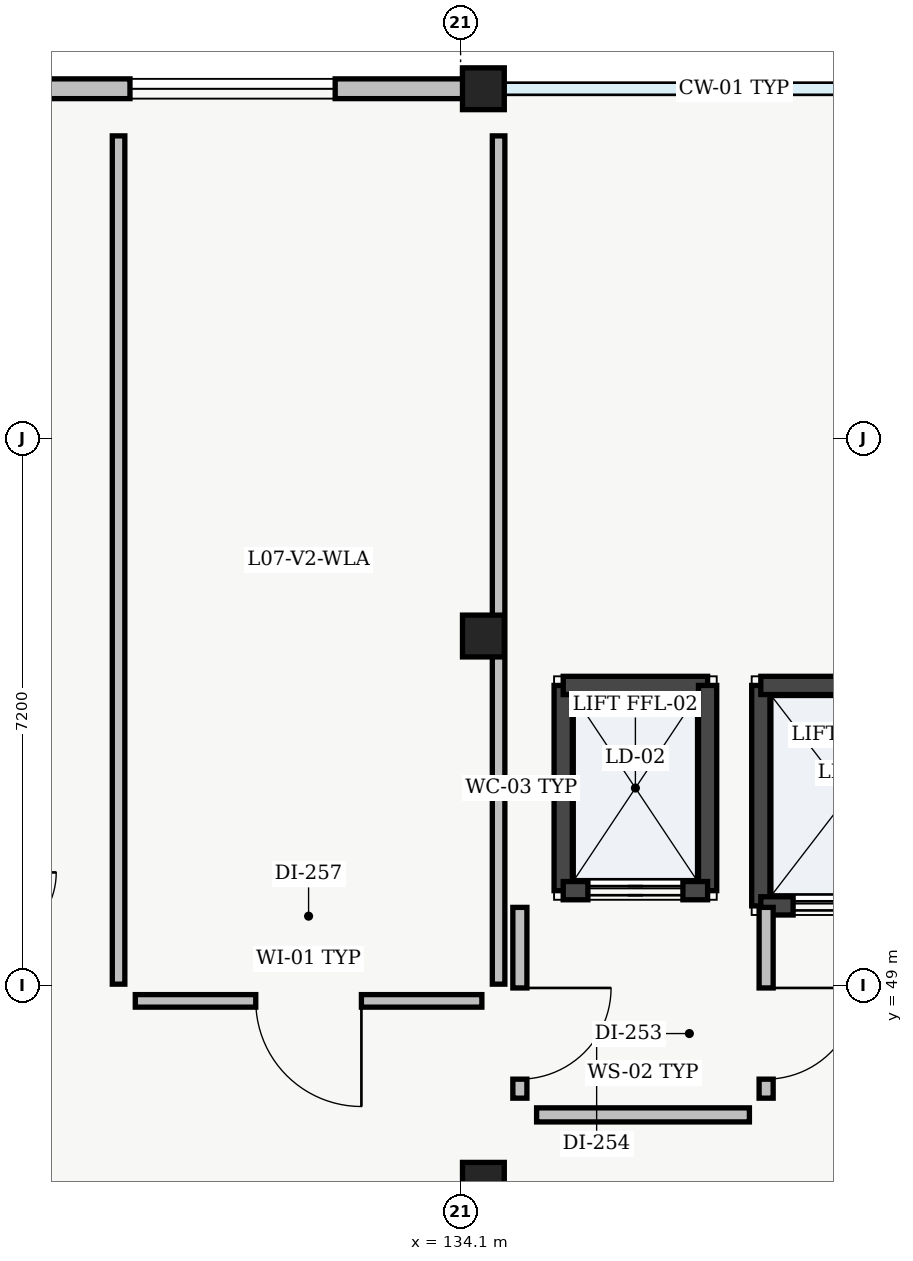
"""IFC4 building model, lengths in metres.
Left out: names, types, materials, properties, quantities, classifications, styles, units other than length and angle.
Written with IfcOpenShell. Run it as: python <this file> out.ifc"""

import sys

from ifc_helpers import new_model, si_unit, direction, frame, frame_2d, origin, origin_2d, place, context, subcontext, project, spatial, rectangle, extrude, element, fill, save


model = new_model("IFC4")
c1 = context("Model", 3, precision=1e-05, world=origin(), true_north=direction((0.0, 1.0)))
c2 = subcontext(c1, "Body", "Model", "MODEL_VIEW")
j1 = project(units=[si_unit("LENGTHUNIT", "METRE"), si_unit("PLANEANGLEUNIT", "RADIAN")], contexts=[c1])
p1 = place(None, origin())
s1 = spatial("IfcSite", under=j1, at=p1, CompositionType="ELEMENT")
p2 = place(p1, origin())
s2 = spatial("IfcBuilding", under=s1, at=p2, CompositionType="ELEMENT")
p3 = place(p2, frame((0.0, 0.0, 32.1)))
s3 = spatial("IfcBuildingStorey", under=s2, at=p3, CompositionType="ELEMENT", Elevation=32.1)
for number, where, z_axis, x_axis in (
    (1, (134.4, 46.4, 0.0), (0.0, 0.0, 1.0), (1.0, 0.0, 0.0)),
    (2, (134.4, 53.6, 0.0), (0.0, 0.0, 1.0), (1.0, 0.0, 0.0)),
    (3, (134.4, 60.8, 0.0), (0.0, 0.0, 1.0), (1.0, 0.0, 0.0)),
):
    element("IfcColumn", number, at=place(p3, frame(where, z_axis=z_axis, x_axis=x_axis)), inside=s3, PredefinedType="COLUMN", context=c2, shape_type="SweptSolid", body=[
        extrude(rectangle(XDim=0.55, YDim=0.55, at=origin_2d()), origin(), (0.0, 0.0, 1.0), 4.305),
    ])
p4 = place(p3, frame((128.07, 60.8, 0.0), z_axis=(0.0, 0.0, 1.0), x_axis=(1.0, 0.0, 0.0)))
e4 = element("IfcWall", 4, at=p4, inside=s3, PredefinedType="STANDARD", context=c2, shape_type="SweptSolid", body=[
    extrude(rectangle(XDim=6.06, YDim=0.26, at=frame_2d((3.03, 0.0))), origin(), (0.0, 0.0, 1.0), 3.79),
])
p5 = place(p4, frame((1.68, 0.0, 0.95)))
e5 = element("IfcOpeningElement", 5, at=p5, cuts=e4, PredefinedType="OPENING", context=c2, shape_type="SweptSolid", body=[
    extrude(rectangle(XDim=2.7, YDim=1.8, at=frame_2d((1.35, 0.9))), frame((0.0, 0.13, 0.0), z_axis=(0.0, -1.0, 0.0), x_axis=(1.0, 0.0, 0.0)), (0.0, 0.0, 1.0), 0.26),
])
p6 = place(p3, frame((135.45, 50.25, 0.0), z_axis=(0.0, 0.0, 1.0), x_axis=(0.0, 1.0, 0.0)))
e6 = element("IfcWall", 6, at=p6, inside=s3, PredefinedType="SHEAR", context=c2, shape_type="SweptSolid", body=[
    extrude(rectangle(XDim=2.7, YDim=0.24, at=frame_2d((1.35, 0.0))), origin(), (0.0, 0.0, 1.0), 4.35),
])
p7 = place(p3, frame((135.45, 52.95, 0.0), z_axis=(0.0, 0.0, 1.0), x_axis=(1.0, 0.0, 0.0)))
e7 = element("IfcWall", 7, at=p7, inside=s3, PredefinedType="SHEAR", context=c2, shape_type="SweptSolid", body=[
    extrude(rectangle(XDim=1.9, YDim=0.24, at=frame_2d((0.95, 0.0))), origin(), (0.0, 0.0, 1.0), 4.35),
])
p8 = place(p3, frame((137.35, 52.95, 0.0), z_axis=(0.0, 0.0, 1.0), x_axis=(0.0, -1.0, 0.0)))
e8 = element("IfcWall", 8, at=p8, inside=s3, PredefinedType="SHEAR", context=c2, shape_type="SweptSolid", body=[
    extrude(rectangle(XDim=2.7, YDim=0.24, at=frame_2d((1.35, 0.0))), origin(), (0.0, 0.0, 1.0), 4.35),
])
p9 = place(p3, frame((137.35, 50.25, 0.0), z_axis=(0.0, 0.0, 1.0), x_axis=(-1.0, 0.0, 0.0)))
e9 = element("IfcWall", 9, at=p9, inside=s3, PredefinedType="SHEAR", context=c2, shape_type="SweptSolid", body=[
    extrude(rectangle(XDim=1.9, YDim=0.24, at=frame_2d((0.95, 0.0))), origin(), (0.0, 0.0, 1.0), 4.35),
])
p10 = place(p9, frame((0.325, 0.0, 0.0)))
e10 = element("IfcOpeningElement", 10, at=p10, cuts=e9, PredefinedType="OPENING", context=c2, shape_type="SweptSolid", body=[
    extrude(rectangle(XDim=1.25, YDim=2.2, at=frame_2d((0.625, 1.1))), frame((0.0, 0.12, 0.0), z_axis=(0.0, -1.0, 0.0), x_axis=(1.0, 0.0, 0.0)), (0.0, 0.0, 1.0), 0.24),
])
p11 = place(p3, frame((138.05, 50.05, 0.0), z_axis=(0.0, 0.0, 1.0), x_axis=(0.0, 1.0, 0.0)))
e11 = element("IfcWall", 11, at=p11, inside=s3, PredefinedType="SHEAR", context=c2, shape_type="SweptSolid", body=[
    extrude(rectangle(XDim=2.9, YDim=0.24, at=frame_2d((1.45, 0.0))), origin(), (0.0, 0.0, 1.0), 4.35),
])
p12 = place(p3, frame((138.05, 52.95, 0.0), z_axis=(0.0, 0.0, 1.0), x_axis=(1.0, 0.0, 0.0)))
e12 = element("IfcWall", 12, at=p12, inside=s3, PredefinedType="SHEAR", context=c2, shape_type="SweptSolid", body=[
    extrude(rectangle(XDim=2.3, YDim=0.24, at=frame_2d((1.15, 0.0))), origin(), (0.0, 0.0, 1.0), 4.35),
])
p13 = place(p3, frame((140.35, 50.05, 0.0), z_axis=(0.0, 0.0, 1.0), x_axis=(-1.0, 0.0, 0.0)))
e13 = element("IfcWall", 13, at=p13, inside=s3, PredefinedType="SHEAR", context=c2, shape_type="SweptSolid", body=[
    extrude(rectangle(XDim=2.3, YDim=0.24, at=frame_2d((1.15, 0.0))), origin(), (0.0, 0.0, 1.0), 4.35),
])
p14 = place(p13, frame((0.425, 0.0, 0.0)))
e14 = element("IfcOpeningElement", 14, at=p14, cuts=e13, PredefinedType="OPENING", context=c2, shape_type="SweptSolid", body=[
    extrude(rectangle(XDim=1.45, YDim=2.3, at=frame_2d((0.725, 1.15))), frame((0.0, 0.12, 0.0), z_axis=(0.0, -1.0, 0.0), x_axis=(1.0, 0.0, 0.0)), (0.0, 0.0, 1.0), 0.24),
])
p15 = place(p3, frame((135.1, 47.3, 0.0), z_axis=(0.0, 0.0, 1.0), x_axis=(1.0, 0.0, 0.0)))
e15 = element("IfcWall", 15, at=p15, inside=s3, PredefinedType="SOLIDWALL", context=c2, shape_type="SweptSolid", body=[
    extrude(rectangle(XDim=2.8, YDim=0.185, at=frame_2d((1.4, 0.0))), origin(), (0.0, 0.0, 1.0), 3.95),
])
p16 = place(p3, frame((138.12, 47.52, 0.0), z_axis=(0.0, 0.0, 1.0), x_axis=(0.0, 1.0, 0.0)))
e16 = element("IfcWall", 16, at=p16, inside=s3, PredefinedType="SOLIDWALL", context=c2, shape_type="SweptSolid", body=[
    extrude(rectangle(XDim=2.51, YDim=0.185, at=frame_2d((1.255, 0.0))), origin(), (0.0, 0.0, 1.0), 3.95),
])
p17 = place(p16, frame((0.25, 0.0, 0.0)))
e17 = element("IfcOpeningElement", 17, at=p17, cuts=e16, PredefinedType="OPENING", context=c2, shape_type="SweptSolid", body=[
    extrude(rectangle(XDim=1.2, YDim=2.15, at=frame_2d((0.6, 1.075))), frame((0.0, 0.093, 0.0), z_axis=(0.0, -1.0, 0.0), x_axis=(1.0, 0.0, 0.0)), (0.0, 0.0, 1.0), 0.185),
])
p18 = place(p3, frame((134.88, 50.03, 0.0), z_axis=(0.0, 0.0, 1.0), x_axis=(0.0, -1.0, 0.0)))
e18 = element("IfcWall", 18, at=p18, inside=s3, PredefinedType="SOLIDWALL", context=c2, shape_type="SweptSolid", body=[
    extrude(rectangle(XDim=2.51, YDim=0.185, at=frame_2d((1.255, 0.0))), origin(), (0.0, 0.0, 1.0), 3.95),
])
p19 = place(p18, frame((1.06, 0.0, 0.0)))
e19 = element("IfcOpeningElement", 19, at=p19, cuts=e18, PredefinedType="OPENING", context=c2, shape_type="SweptSolid", body=[
    extrude(rectangle(XDim=1.2, YDim=2.15, at=frame_2d((0.6, 1.075))), frame((0.0, 0.093, 0.0), z_axis=(0.0, -1.0, 0.0), x_axis=(1.0, 0.0, 0.0)), (0.0, 0.0, 1.0), 0.185),
])
p20 = place(p3, frame((129.82, 48.8, 0.0), z_axis=(0.0, 0.0, 1.0), x_axis=(1.0, 0.0, 0.0)))
e20 = element("IfcWall", 20, at=p20, inside=s3, PredefinedType="PARTITIONING", context=c2, shape_type="SweptSolid", body=[
    extrude(rectangle(XDim=4.56, YDim=0.165, at=frame_2d((2.28, 0.0))), origin(), (0.0, 0.0, 1.0), 3.89),
])
p21 = place(p20, frame((1.585, 0.0, 0.0)))
e21 = element("IfcOpeningElement", 21, at=p21, cuts=e20, PredefinedType="OPENING", context=c2, shape_type="SweptSolid", body=[
    extrude(rectangle(XDim=1.39, YDim=2.16, at=frame_2d((0.695, 1.08))), frame((0.0, 0.083, 0.0), z_axis=(0.0, -1.0, 0.0), x_axis=(1.0, 0.0, 0.0)), (0.0, 0.0, 1.0), 0.165),
])
p22 = place(p3, frame((134.6, 49.02, 0.0), z_axis=(0.0, 0.0, 1.0), x_axis=(0.0, 1.0, 0.0)))
e22 = element("IfcWall", 22, at=p22, inside=s3, PredefinedType="PARTITIONING", context=c2, shape_type="SweptSolid", body=[
    extrude(rectangle(XDim=11.16, YDim=0.165, at=frame_2d((5.58, 0.0))), origin(), (0.0, 0.0, 1.0), 3.74),
])
p23 = place(p3, frame((129.6, 60.18, 0.0), z_axis=(0.0, 0.0, 1.0), x_axis=(0.0, -1.0, 0.0)))
e23 = element("IfcWall", 23, at=p23, inside=s3, PredefinedType="PARTITIONING", context=c2, shape_type="SweptSolid", body=[
    extrude(rectangle(XDim=11.16, YDim=0.165, at=frame_2d((5.58, 0.0))), origin(), (0.0, 0.0, 1.0), 3.95),
])
p24 = place(p5, origin())
e24 = element("IfcWindow", 24, at=p24, inside=s3, PartitioningType="SINGLE_PANEL", PredefinedType="WINDOW", context=c2, shape_type="SweptSolid", body=[
    extrude(rectangle(XDim=2.7, YDim=1.8, at=frame_2d((1.35, 0.9))), frame((0.0, 0.03, 0.0), z_axis=(0.0, -1.0, 0.0), x_axis=(1.0, 0.0, 0.0)), (0.0, 0.0, 1.0), 0.06),
])
fill(e5, e24)
p25 = place(p10, origin())
e25 = element("IfcDoor", 25, at=p25, inside=s3, OperationType="SLIDING_TO_RIGHT", PredefinedType="DOOR", context=c2, shape_type="SweptSolid", body=[
    extrude(rectangle(XDim=1.25, YDim=2.2, at=frame_2d((0.625, 1.1))), frame((0.0, 0.025, 0.0), z_axis=(0.0, -1.0, 0.0), x_axis=(1.0, 0.0, 0.0)), (0.0, 0.0, 1.0), 0.05),
])
fill(e10, e25)
p26 = place(p14, origin())
e26 = element("IfcDoor", 26, at=p26, inside=s3, OperationType="DOUBLE_DOOR_SLIDING", PredefinedType="DOOR", context=c2, shape_type="SweptSolid", body=[
    extrude(rectangle(XDim=1.45, YDim=2.3, at=frame_2d((0.725, 1.15))), frame((0.0, 0.025, 0.0), z_axis=(0.0, -1.0, 0.0), x_axis=(1.0, 0.0, 0.0)), (0.0, 0.0, 1.0), 0.05),
])
fill(e14, e26)
p27 = place(p17, origin())
e27 = element("IfcDoor", 27, at=p27, inside=s3, OperationType="SINGLE_SWING_RIGHT", PredefinedType="DOOR", context=c2, shape_type="SweptSolid", body=[
    extrude(rectangle(XDim=1.2, YDim=2.15, at=frame_2d((0.6, 1.075))), frame((0.0, 0.025, 0.0), z_axis=(0.0, -1.0, 0.0), x_axis=(1.0, 0.0, 0.0)), (0.0, 0.0, 1.0), 0.05),
])
fill(e17, e27)
p28 = place(p19, origin())
e28 = element("IfcDoor", 28, at=p28, inside=s3, OperationType="SINGLE_SWING_LEFT", PredefinedType="DOOR", context=c2, shape_type="SweptSolid", body=[
    extrude(rectangle(XDim=1.2, YDim=2.15, at=frame_2d((0.6, 1.075))), frame((0.0, 0.025, 0.0), z_axis=(0.0, -1.0, 0.0), x_axis=(1.0, 0.0, 0.0)), (0.0, 0.0, 1.0), 0.05),
])
fill(e19, e28)
p29 = place(p21, origin())
e29 = element("IfcDoor", 29, at=p29, inside=s3, OperationType="SINGLE_SWING_RIGHT", PredefinedType="DOOR", context=c2, shape_type="SweptSolid", body=[
    extrude(rectangle(XDim=1.39, YDim=2.16, at=frame_2d((0.695, 1.08))), frame((0.0, 0.025, 0.0), z_axis=(0.0, -1.0, 0.0), x_axis=(1.0, 0.0, 0.0)), (0.0, 0.0, 1.0), 0.05),
])
fill(e21, e29)
save(model, sys.argv[1])
